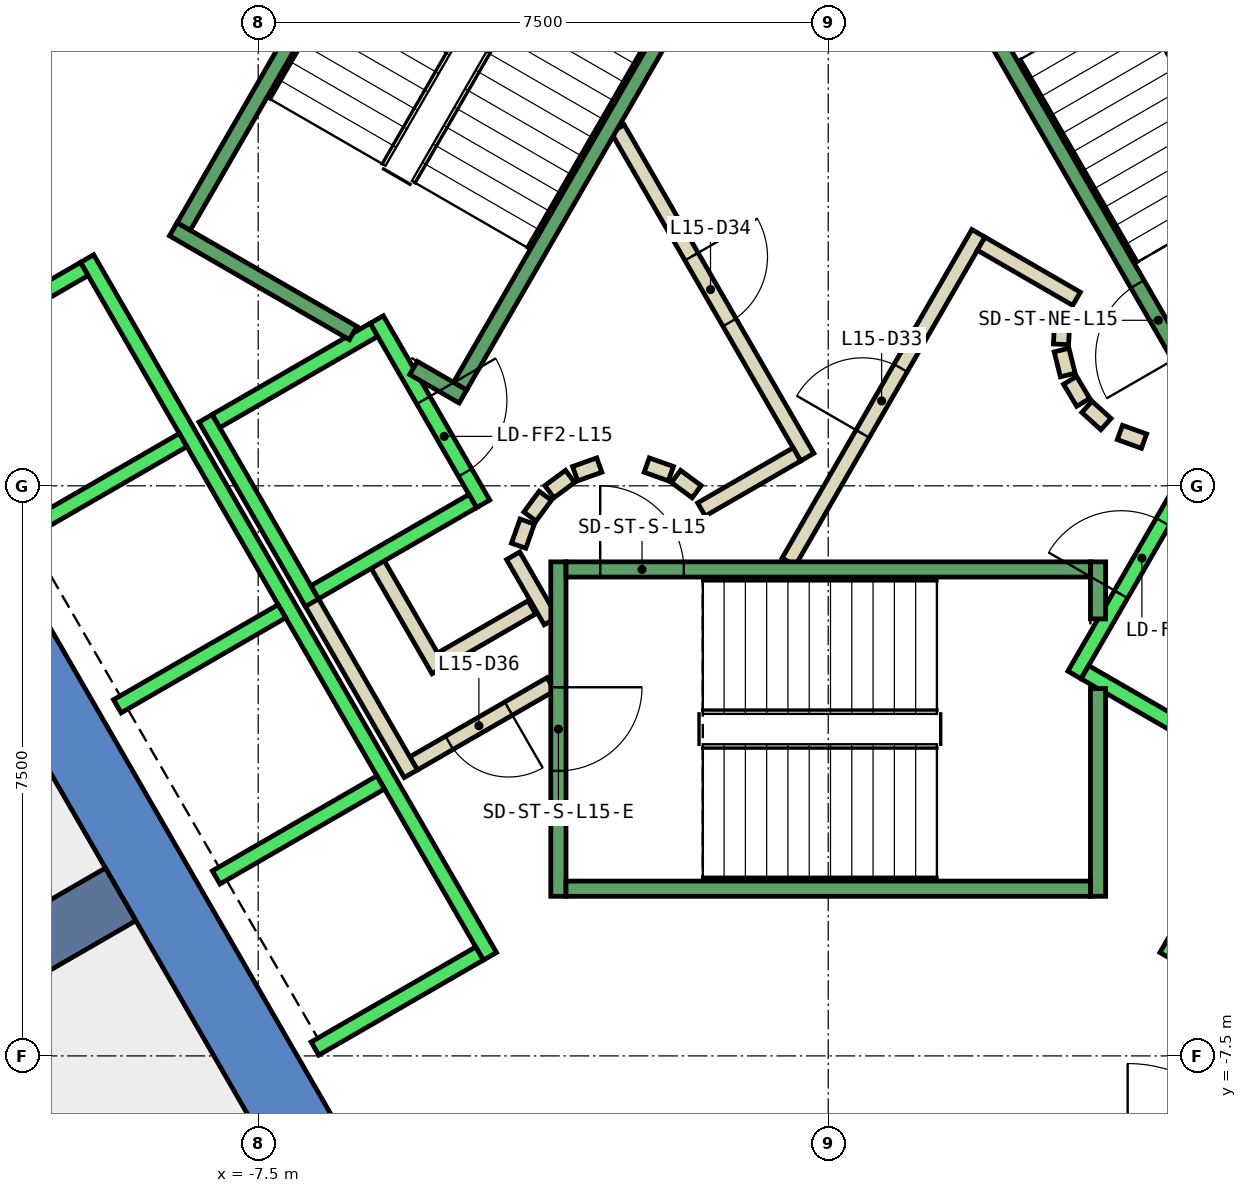
"""IFC4 building model, lengths in metres.
Left out: names, types, materials, properties, quantities, classifications, styles, units other than length and angle.
Written with IfcOpenShell. Run it as: python <this file> out.ifc"""

import sys

from ifc_helpers import new_model, si_unit, direction, frame, frame_2d, origin, place, context, subcontext, project, spatial, polyline, rectangle, outline, extrude, element, fill, save


model = new_model("IFC4")
c1 = context("Model", 3, precision=1e-05, world=origin(), true_north=direction((0.0, 1.0)))
c2 = subcontext(c1, "Body", "Model", "MODEL_VIEW")
j1 = project(units=[si_unit("LENGTHUNIT", "METRE"), si_unit("PLANEANGLEUNIT", "RADIAN")], contexts=[c1])
p1 = place(None, origin())
s1 = spatial("IfcSite", under=j1, at=p1, CompositionType="ELEMENT")
p2 = place(p1, origin())
s2 = spatial("IfcBuilding", under=s1, at=p2, CompositionType="ELEMENT")
p3 = place(p2, frame((0.0, 0.0, 72.8)))
s3 = spatial("IfcBuildingStorey", under=s2, at=p3, CompositionType="ELEMENT", Elevation=72.8)
p4 = place(p3, frame((0.0, 0.0, -0.4)))
e1 = element("IfcWall", 1, at=p4, inside=s3, PredefinedType="SHEAR", context=c2, shape_type="SweptSolid", body=[
    extrude(outline(polyline([(-12.267, 5.252), (-11.444, 4.777), (-6.38, 13.55), (-6.928, 14.5), (-12.267, 5.252)])), origin(), (0.0, 0.0, 1.0), 4.2),
])
p5 = place(p3, frame((0.0, 0.0, -0.4)))
e2 = element("IfcWall", 2, at=p5, inside=s3, PredefinedType="SHEAR", context=c2, shape_type="SweptSolid", body=[
    extrude(outline(polyline([(-13.856, 2.5), (-6.928, -9.5), (-6.38, -8.55), (-12.759, 2.5), (-13.856, 2.5)])), origin(), (0.0, 0.0, 1.0), 4.2),
])
p6 = place(p3, frame((-9.31, -5.375, -0.4), z_axis=(0.0, 0.0, 1.0), x_axis=(-0.866017533419, -0.500013631625, 0.0)))
e3 = element("IfcWall", 3, at=p6, inside=s3, PredefinedType="SHEAR", context=c2, shape_type="SweptSolid", body=[
    extrude(rectangle(XDim=9.0, YDim=0.8, at=frame_2d((4.5, 0.0))), origin(), (0.0, 0.0, 1.0), 4.2),
])
p7 = place(p3, frame((-3.9, -1.599, 0.0), z_axis=(0.0, 0.0, 1.0), x_axis=(-0.865969445389, -0.500096910261, 0.0)))
e4 = element("IfcWall", 4, at=p7, inside=s3, PredefinedType="PARTITIONING", context=c2, shape_type="SweptSolid", body=[
    extrude(rectangle(XDim=1.373, YDim=0.2, at=frame_2d((0.687, 0.0))), origin(), (0.0, 0.0, 1.0), 3.8),
])
p8 = place(p3, frame((-5.126, -2.422, 0.0), z_axis=(0.0, 0.0, 1.0), x_axis=(-0.500062241894, 0.865989465428, 0.0)))
e5 = element("IfcWall", 5, at=p8, inside=s3, PredefinedType="PARTITIONING", context=c2, shape_type="SweptSolid", body=[
    extrude(rectangle(XDim=1.7, YDim=0.2, at=frame_2d((0.85, 0.0))), origin(), (0.0, 0.0, 1.0), 3.8),
])
p9 = place(p3, frame((-3.65, -2.61, 0.0), z_axis=(0.0, 0.0, 1.0), x_axis=(-0.866072462134, -0.499918483688, 0.0)))
e6 = element("IfcWall", 6, at=p9, inside=s3, PredefinedType="PARTITIONING", context=c2, shape_type="SweptSolid", body=[
    extrude(rectangle(XDim=2.084, YDim=0.2, at=frame_2d((1.042, 0.0))), origin(), (0.0, 0.0, 1.0), 3.8),
])
p10 = place(p9, frame((0.642, 0.0, 0.0)))
e7 = element("IfcOpeningElement", 7, at=p10, cuts=e6, PredefinedType="OPENING", context=c2, shape_type="SweptSolid", body=[
    extrude(rectangle(XDim=0.9, YDim=2.1, at=frame_2d((0.45, 1.05))), frame((0.0, 0.11, 0.0), z_axis=(0.0, -1.0, 0.0), x_axis=(1.0, 0.0, 0.0)), (0.0, 0.0, 1.0), 0.22),
])
p11 = place(p3, frame((-5.492, -3.788, 0.0), z_axis=(0.0, 0.0, 1.0), x_axis=(-0.500008949224, 0.866020236886, 0.0)))
e8 = element("IfcWall", 8, at=p11, inside=s3, PredefinedType="PARTITIONING", context=c2, shape_type="SweptSolid", body=[
    extrude(rectangle(XDim=2.68, YDim=0.2, at=frame_2d((1.34, 0.0))), origin(), (0.0, 0.0, 1.0), 3.8),
])
p12 = place(p3, frame((-4.145, -0.92, 0.0), z_axis=(0.0, 0.0, 1.0), x_axis=(0.499743786207, -0.866173278362, 0.0)))
e9 = element("IfcWall", 9, at=p12, inside=s3, PredefinedType="PARTITIONING", context=c2, shape_type="SweptSolid", body=[
    extrude(rectangle(XDim=0.991, YDim=0.2, at=frame_2d((0.495, 0.0))), origin(), (0.0, 0.0, 1.0), 3.8),
])
p13 = place(p3, frame((-0.52, -1.0, 0.0), z_axis=(0.0, 0.0, 1.0), x_axis=(0.50011622646, 0.865958290007, 0.0)))
e10 = element("IfcWall", 10, at=p13, inside=s3, PredefinedType="PARTITIONING", context=c2, shape_type="SweptSolid", body=[
    extrude(rectangle(XDim=4.991, YDim=0.2, at=frame_2d((2.496, 0.0))), origin(), (0.0, 0.0, 1.0), 3.8),
])
p14 = place(p13, frame((1.945, 0.0, 0.0)))
e11 = element("IfcOpeningElement", 11, at=p14, cuts=e10, PredefinedType="OPENING", context=c2, shape_type="SweptSolid", body=[
    extrude(rectangle(XDim=1.0, YDim=2.1, at=frame_2d((0.5, 1.05))), frame((0.0, 0.11, 0.0), z_axis=(0.0, -1.0, 0.0), x_axis=(1.0, 0.0, 0.0)), (0.0, 0.0, 1.0), 0.22),
])
p15 = place(p3, frame((2.012, 3.186, 0.0), z_axis=(0.0, 0.0, 1.0), x_axis=(0.865891012941, -0.500232699559, 0.0)))
e12 = element("IfcWall", 12, at=p15, inside=s3, PredefinedType="PARTITIONING", context=c2, shape_type="SweptSolid", body=[
    extrude(rectangle(XDim=1.449, YDim=0.2, at=frame_2d((0.725, 0.0))), origin(), (0.0, 0.0, 1.0), 3.8),
])
p16 = place(p3, frame((3.079, 2.199, 0.0), z_axis=(0.0, 0.0, 1.0), x_axis=(-0.047771483479, -0.998858290933, 0.0)))
e13 = element("IfcWall", 13, at=p16, inside=s3, PredefinedType="PARTITIONING", context=c2, shape_type="SweptSolid", body=[
    extrude(rectangle(XDim=0.337, YDim=0.2, at=frame_2d((0.169, 0.0))), origin(), (0.0, 0.0, 1.0), 3.8),
])
p17 = place(p3, frame((3.07, 1.786, 0.0), z_axis=(0.0, 0.0, 1.0), x_axis=(0.242705583207, -0.970099994784, 0.0)))
e14 = element("IfcWall", 14, at=p17, inside=s3, PredefinedType="PARTITIONING", context=c2, shape_type="SweptSolid", body=[
    extrude(rectangle(XDim=0.338, YDim=0.2, at=frame_2d((0.169, 0.0))), origin(), (0.0, 0.0, 1.0), 3.8),
])
for number, where, z_axis, x_axis in (
    (15, (3.182, 1.388, 0.0), (0.0, 0.0, 1.0), (0.512, -0.859, 0.0)),
    (16, (3.404, 1.039, 0.0), (0.0, 0.0, 1.0), (0.74, -0.672, 0.0)),
):
    element("IfcWall", number, at=place(p3, frame(where, z_axis=z_axis, x_axis=x_axis)), inside=s3, PredefinedType="PARTITIONING", context=c2, shape_type="SweptSolid", body=[
        extrude(rectangle(XDim=0.338, YDim=0.2, at=frame_2d((0.169, 0.0))), origin(), (0.0, 0.0, 1.0), 3.8),
    ])
p18 = place(p3, frame((3.838, 0.702, 0.0), z_axis=(0.0, 0.0, 1.0), x_axis=(0.941035081519, -0.338308993895, 0.0)))
e17 = element("IfcWall", 17, at=p18, inside=s3, PredefinedType="PARTITIONING", context=c2, shape_type="SweptSolid", body=[
    extrude(rectangle(XDim=0.337, YDim=0.2, at=frame_2d((0.168, 0.0))), origin(), (0.0, 0.0, 1.0), 3.8),
])
p19 = place(p3, frame((-2.771, 4.7, 0.0), z_axis=(0.0, 0.0, 1.0), x_axis=(0.499969479948, -0.866043023828, 0.0)))
e18 = element("IfcWall", 18, at=p19, inside=s3, PredefinedType="PARTITIONING", context=c2, shape_type="SweptSolid", body=[
    extrude(rectangle(XDim=4.99, YDim=0.2, at=frame_2d((2.495, 0.0))), origin(), (0.0, 0.0, 1.0), 3.8),
])
p20 = place(p19, frame((1.945, 0.0, 0.0)))
e19 = element("IfcOpeningElement", 19, at=p20, cuts=e18, PredefinedType="OPENING", context=c2, shape_type="SweptSolid", body=[
    extrude(rectangle(XDim=1.0, YDim=2.1, at=frame_2d((0.5, 1.05))), frame((0.0, 0.11, 0.0), z_axis=(0.0, -1.0, 0.0), x_axis=(1.0, 0.0, 0.0)), (0.0, 0.0, 1.0), 0.22),
])
p21 = place(p3, frame((-0.412, 0.414, 0.0), z_axis=(0.0, 0.0, 1.0), x_axis=(-0.866017369001, -0.500013916395, 0.0)))
e20 = element("IfcWall", 20, at=p21, inside=s3, PredefinedType="PARTITIONING", context=c2, shape_type="SweptSolid", body=[
    extrude(rectangle(XDim=1.45, YDim=0.2, at=frame_2d((0.725, 0.0))), origin(), (0.0, 0.0, 1.0), 3.8),
])
p22 = place(p3, frame((-1.731, -0.077, 0.0), z_axis=(0.0, 0.0, 1.0), x_axis=(-0.804311165252, 0.594208338422, 0.0)))
e21 = element("IfcWall", 21, at=p22, inside=s3, PredefinedType="PARTITIONING", context=c2, shape_type="SweptSolid", body=[
    extrude(rectangle(XDim=0.338, YDim=0.2, at=frame_2d((0.169, 0.0))), origin(), (0.0, 0.0, 1.0), 3.8),
])
p23 = place(p3, frame((-2.07, 0.16, 0.0), z_axis=(0.0, 0.0, 1.0), x_axis=(-0.942199461132, 0.335052496547, 0.0)))
e22 = element("IfcWall", 22, at=p23, inside=s3, PredefinedType="PARTITIONING", context=c2, shape_type="SweptSolid", body=[
    extrude(rectangle(XDim=0.337, YDim=0.2, at=frame_2d((0.169, 0.0))), origin(), (0.0, 0.0, 1.0), 3.8),
])
p24 = place(p3, frame((-3.012, 0.273, 0.0), z_axis=(0.0, 0.0, 1.0), x_axis=(-0.942280615813, -0.334824194261, 0.0)))
e23 = element("IfcWall", 23, at=p24, inside=s3, PredefinedType="PARTITIONING", context=c2, shape_type="SweptSolid", body=[
    extrude(rectangle(XDim=0.338, YDim=0.2, at=frame_2d((0.169, 0.0))), origin(), (0.0, 0.0, 1.0), 3.8),
])
p25 = place(p3, frame((-3.397, 0.124, 0.0), z_axis=(0.0, 0.0, 1.0), x_axis=(-0.804311165252, -0.594208338422, 0.0)))
e24 = element("IfcWall", 24, at=p25, inside=s3, PredefinedType="PARTITIONING", context=c2, shape_type="SweptSolid", body=[
    extrude(rectangle(XDim=0.338, YDim=0.2, at=frame_2d((0.169, 0.0))), origin(), (0.0, 0.0, 1.0), 3.8),
])
p26 = place(p3, frame((-3.723, -0.131, 0.0), z_axis=(0.0, 0.0, 1.0), x_axis=(-0.594675113454, -0.803966112121, 0.0)))
e25 = element("IfcWall", 25, at=p26, inside=s3, PredefinedType="PARTITIONING", context=c2, shape_type="SweptSolid", body=[
    extrude(rectangle(XDim=0.338, YDim=0.2, at=frame_2d((0.169, 0.0))), origin(), (0.0, 0.0, 1.0), 3.8),
])
p27 = place(p3, frame((-3.96, -0.47, 0.0), z_axis=(0.0, 0.0, 1.0), x_axis=(-0.334824194261, -0.942280615813, 0.0)))
e26 = element("IfcWall", 26, at=p27, inside=s3, PredefinedType="PARTITIONING", context=c2, shape_type="SweptSolid", body=[
    extrude(rectangle(XDim=0.338, YDim=0.2, at=frame_2d((0.169, 0.0))), origin(), (0.0, 0.0, 1.0), 3.8),
])
p28 = place(p3, frame((-5.94, 2.188, 0.0), z_axis=(0.0, 0.0, 1.0), x_axis=(0.49994636267, -0.866056369097, 0.0)))
e27 = element("IfcWall", 27, at=p28, inside=s3, PredefinedType="STANDARD", context=c2, shape_type="SweptSolid", body=[
    extrude(rectangle(XDim=2.8, YDim=0.2, at=frame_2d((1.4, 0.0))), origin(), (0.0, 0.0, 1.0), 3.8),
])
p29 = place(p28, frame((1.225, 0.0, 0.0)))
e28 = element("IfcOpeningElement", 28, at=p29, cuts=e27, PredefinedType="OPENING", context=c2, shape_type="SweptSolid", body=[
    extrude(rectangle(XDim=1.1, YDim=2.1, at=frame_2d((0.55, 1.05))), frame((0.0, 0.11, 0.0), z_axis=(0.0, -1.0, 0.0), x_axis=(1.0, 0.0, 0.0)), (0.0, 0.0, 1.0), 0.22),
])
p30 = place(p3, frame((-8.192, 0.888, 0.0), z_axis=(0.0, 0.0, 1.0), x_axis=(0.49994636267, -0.866056369097, 0.0)))
e29 = element("IfcWall", 29, at=p30, inside=s3, PredefinedType="STANDARD", context=c2, shape_type="SweptSolid", body=[
    extrude(rectangle(XDim=2.8, YDim=0.2, at=frame_2d((1.4, 0.0))), origin(), (0.0, 0.0, 1.0), 3.8),
])
for number, where, z_axis, x_axis in (
    (30, (-5.977, 2.052, 0.0), (0.0, 0.0, 1.0), (-0.866, -0.5, 0.0)),
    (31, (-4.677, -0.2, 0.0), (0.0, 0.0, 1.0), (-0.866, -0.5, 0.0)),
):
    element("IfcWall", number, at=place(p3, frame(where, z_axis=z_axis, x_axis=x_axis)), inside=s3, PredefinedType="STANDARD", context=c2, shape_type="SweptSolid", body=[
        extrude(rectangle(XDim=2.399, YDim=0.2, at=frame_2d((1.2, 0.0))), origin(), (0.0, 0.0, 1.0), 3.8),
    ])
p31 = place(p3, frame((-9.751, 2.99, 0.0), z_axis=(0.0, 0.0, 1.0), x_axis=(0.50000090737, -0.866024879913, 0.0)))
e32 = element("IfcWall", 32, at=p31, inside=s3, PredefinedType="STANDARD", context=c2, shape_type="SweptSolid", body=[
    extrude(rectangle(XDim=10.6, YDim=0.2, at=frame_2d((5.3, 0.0))), origin(), (0.0, 0.0, 1.0), 3.8),
])
p32 = place(p3, frame((-9.788, 2.853, 0.0), z_axis=(0.0, 0.0, 1.0), x_axis=(-0.865998541277, -0.500046524342, 0.0)))
e33 = element("IfcWall", 33, at=p32, inside=s3, PredefinedType="STANDARD", context=c2, shape_type="SweptSolid", body=[
    extrude(rectangle(XDim=2.5, YDim=0.2, at=frame_2d((1.25, 0.0))), origin(), (0.0, 0.0, 1.0), 3.8),
])
for number, where, z_axis, x_axis in (
    (34, (-8.488, 0.602, 0.0), (0.0, 0.0, 1.0), (-0.866, -0.5, 0.0)),
    (35, (-7.188, -1.65, 0.0), (0.0, 0.0, 1.0), (-0.866, -0.5, 0.0)),
    (36, (-5.888, -3.902, 0.0), (0.0, 0.0, 1.0), (-0.866, -0.5, 0.0)),
    (37, (-4.588, -6.153, 0.0), (0.0, 0.0, 1.0), (-0.866, -0.5, 0.0)),
):
    element("IfcWall", number, at=place(p3, frame(where, z_axis=z_axis, x_axis=x_axis)), inside=s3, PredefinedType="STANDARD", context=c2, shape_type="SweptSolid", body=[
        extrude(rectangle(XDim=2.5, YDim=0.2, at=frame_2d((1.25, 0.0))), origin(), (0.0, 0.0, 1.0), 3.8),
    ])
p33 = place(p3, frame((3.24, -2.488, 0.0), z_axis=(0.0, 0.0, 1.0), x_axis=(0.49994636267, 0.866056369097, 0.0)))
e38 = element("IfcWall", 38, at=p33, inside=s3, PredefinedType="STANDARD", context=c2, shape_type="SweptSolid", body=[
    extrude(rectangle(XDim=2.8, YDim=0.2, at=frame_2d((1.4, 0.0))), origin(), (0.0, 0.0, 1.0), 3.8),
])
p34 = place(p33, frame((1.225, 0.0, 0.0)))
e39 = element("IfcOpeningElement", 39, at=p34, cuts=e38, PredefinedType="OPENING", context=c2, shape_type="SweptSolid", body=[
    extrude(rectangle(XDim=1.1, YDim=2.1, at=frame_2d((0.55, 1.05))), frame((0.0, 0.11, 0.0), z_axis=(0.0, -1.0, 0.0), x_axis=(1.0, 0.0, 0.0)), (0.0, 0.0, 1.0), 0.22),
])
p35 = place(p3, frame((3.377, -2.452, 0.0), z_axis=(0.0, 0.0, 1.0), x_axis=(0.865955154139, -0.50012165622, 0.0)))
e40 = element("IfcWall", 40, at=p35, inside=s3, PredefinedType="STANDARD", context=c2, shape_type="SweptSolid", body=[
    extrude(rectangle(XDim=2.4, YDim=0.2, at=frame_2d((1.2, 0.0))), origin(), (0.0, 0.0, 1.0), 3.8),
])
p36 = place(p3, frame((4.451, -6.19, 0.0), z_axis=(0.0, 0.0, 1.0), x_axis=(0.50000090737, 0.866024879913, 0.0)))
e41 = element("IfcWall", 41, at=p36, inside=s3, PredefinedType="STANDARD", context=c2, shape_type="SweptSolid", body=[
    extrude(rectangle(XDim=10.6, YDim=0.2, at=frame_2d((5.3, 0.0))), origin(), (0.0, 0.0, 1.0), 3.8),
])
p37 = place(p3, frame((-3.55, -1.0, 0.0), z_axis=(0.0, 0.0, 1.0), x_axis=(0.0, -1.0, 0.0)))
e42 = element("IfcWall", 42, at=p37, inside=s3, PredefinedType="STANDARD", context=c2, shape_type="SweptSolid", body=[
    extrude(rectangle(XDim=4.4, YDim=0.2, at=frame_2d((2.2, 0.0))), origin(), (0.0, 0.0, 1.0), 3.8),
])
p38 = place(p37, frame((1.65, 0.0, 0.0)))
e43 = element("IfcOpeningElement", 43, at=p38, cuts=e42, PredefinedType="OPENING", context=c2, shape_type="SweptSolid", body=[
    extrude(rectangle(XDim=1.1, YDim=2.2, at=frame_2d((0.55, 1.1))), frame((0.0, 0.11, 0.0), z_axis=(0.0, -1.0, 0.0), x_axis=(1.0, 0.0, 0.0)), (0.0, 0.0, 1.0), 0.22),
])
p39 = place(p3, frame((3.55, -2.667, 0.0), z_axis=(0.0, 0.0, 1.0), x_axis=(0.0, -1.0, 0.0)))
e44 = element("IfcWall", 44, at=p39, inside=s3, PredefinedType="STANDARD", context=c2, shape_type="SweptSolid", body=[
    extrude(rectangle(XDim=2.733, YDim=0.2, at=frame_2d((1.366, 0.0))), origin(), (0.0, 0.0, 1.0), 3.8),
])
p40 = place(p3, frame((3.55, -1.0, 0.0), z_axis=(0.0, 0.0, 1.0), x_axis=(0.0, -1.0, 0.0)))
e45 = element("IfcWall", 45, at=p40, inside=s3, PredefinedType="STANDARD", context=c2, shape_type="SweptSolid", body=[
    extrude(rectangle(XDim=0.751, YDim=0.2, at=frame_2d((0.375, 0.0))), origin(), (0.0, 0.0, 1.0), 3.8),
])
p41 = place(p3, frame((-3.45, -1.1, 0.0), z_axis=(0.0, 0.0, 1.0), x_axis=(1.0, 0.0, 0.0)))
e46 = element("IfcWall", 46, at=p41, inside=s3, PredefinedType="STANDARD", context=c2, shape_type="SweptSolid", body=[
    extrude(rectangle(XDim=6.9, YDim=0.2, at=frame_2d((3.45, 0.0))), origin(), (0.0, 0.0, 1.0), 3.8),
])
p42 = place(p41, frame((0.45, 0.0, 0.0)))
e47 = element("IfcOpeningElement", 47, at=p42, cuts=e46, PredefinedType="OPENING", context=c2, shape_type="SweptSolid", body=[
    extrude(rectangle(XDim=1.1, YDim=2.2, at=frame_2d((0.55, 1.1))), frame((0.0, 0.11, 0.0), z_axis=(0.0, -1.0, 0.0), x_axis=(1.0, 0.0, 0.0)), (0.0, 0.0, 1.0), 0.22),
])
p43 = place(p3, frame((-3.45, -5.3, 0.0), z_axis=(0.0, 0.0, 1.0), x_axis=(1.0, 0.0, 0.0)))
e48 = element("IfcWall", 48, at=p43, inside=s3, PredefinedType="STANDARD", context=c2, shape_type="SweptSolid", body=[
    extrude(rectangle(XDim=6.9, YDim=0.2, at=frame_2d((3.45, 0.0))), origin(), (0.0, 0.0, 1.0), 3.8),
])
p44 = place(p3, frame((4.843, 1.312, 0.0), z_axis=(0.0, 0.0, 1.0), x_axis=(-0.499963383562, 0.866046543262, 0.0)))
e49 = element("IfcWall", 49, at=p44, inside=s3, PredefinedType="STANDARD", context=c2, shape_type="SweptSolid", body=[
    extrude(rectangle(XDim=6.9, YDim=0.2, at=frame_2d((3.45, 0.0))), origin(), (0.0, 0.0, 1.0), 3.8),
])
p45 = place(p44, frame((0.45, 0.0, 0.0)))
e50 = element("IfcOpeningElement", 50, at=p45, cuts=e49, PredefinedType="OPENING", context=c2, shape_type="SweptSolid", body=[
    extrude(rectangle(XDim=1.1, YDim=2.2, at=frame_2d((0.55, 1.1))), frame((0.0, 0.11, 0.0), z_axis=(0.0, -1.0, 0.0), x_axis=(1.0, 0.0, 0.0)), (0.0, 0.0, 1.0), 0.22),
])
p46 = place(p3, frame((-6.25, 2.01, 0.0), z_axis=(0.0, 0.0, 1.0), x_axis=(-0.86611865017, 0.499838457731, 0.0)))
e51 = element("IfcWall", 51, at=p46, inside=s3, PredefinedType="STANDARD", context=c2, shape_type="SweptSolid", body=[
    extrude(rectangle(XDim=2.733, YDim=0.2, at=frame_2d((1.366, 0.0))), origin(), (0.0, 0.0, 1.0), 3.8),
])
p47 = place(p3, frame((-4.806, 1.176, 0.0), z_axis=(0.0, 0.0, 1.0), x_axis=(-0.866558586415, 0.499075361355, 0.0)))
e52 = element("IfcWall", 52, at=p47, inside=s3, PredefinedType="STANDARD", context=c2, shape_type="SweptSolid", body=[
    extrude(rectangle(XDim=0.751, YDim=0.2, at=frame_2d((0.376, 0.0))), origin(), (0.0, 0.0, 1.0), 3.8),
])
p48 = place(p3, frame((-1.393, 7.288, 0.0), z_axis=(0.0, 0.0, 1.0), x_axis=(-0.499963383562, -0.866046543262, 0.0)))
e53 = element("IfcWall", 53, at=p48, inside=s3, PredefinedType="STANDARD", context=c2, shape_type="SweptSolid", body=[
    extrude(rectangle(XDim=6.9, YDim=0.2, at=frame_2d((3.45, 0.0))), origin(), (0.0, 0.0, 1.0), 3.8),
])
p49 = place(p48, frame((0.45, 0.0, 0.0)))
e54 = element("IfcOpeningElement", 54, at=p49, cuts=e53, PredefinedType="OPENING", context=c2, shape_type="SweptSolid", body=[
    extrude(rectangle(XDim=1.1, YDim=2.2, at=frame_2d((0.55, 1.1))), frame((0.0, 0.11, 0.0), z_axis=(0.0, -1.0, 0.0), x_axis=(1.0, 0.0, 0.0)), (0.0, 0.0, 1.0), 0.22),
])
p50 = place(p3, frame((-5.03, 9.388, 0.0), z_axis=(0.0, 0.0, 1.0), x_axis=(-0.499978703459, -0.866037698999, 0.0)))
e55 = element("IfcWall", 55, at=p50, inside=s3, PredefinedType="STANDARD", context=c2, shape_type="SweptSolid", body=[
    extrude(rectangle(XDim=6.9, YDim=0.2, at=frame_2d((3.45, 0.0))), origin(), (0.0, 0.0, 1.0), 3.8),
])
p51 = place(p14, origin())
e56 = element("IfcDoor", 56, at=p51, inside=s3, OperationType="SINGLE_SWING_LEFT", PredefinedType="DOOR", context=c2, shape_type="SweptSolid", body=[
    extrude(rectangle(XDim=1.0, YDim=2.1, at=frame_2d((0.5, 1.05))), frame((0.0, 0.025, 0.0), z_axis=(0.0, -1.0, 0.0), x_axis=(1.0, 0.0, 0.0)), (0.0, 0.0, 1.0), 0.05),
])
fill(e11, e56)
p52 = place(p20, origin())
e57 = element("IfcDoor", 57, at=p52, inside=s3, OperationType="SINGLE_SWING_RIGHT", PredefinedType="DOOR", context=c2, shape_type="SweptSolid", body=[
    extrude(rectangle(XDim=1.0, YDim=2.1, at=frame_2d((0.5, 1.05))), frame((0.0, 0.025, 0.0), z_axis=(0.0, -1.0, 0.0), x_axis=(1.0, 0.0, 0.0)), (0.0, 0.0, 1.0), 0.05),
])
fill(e19, e57)
p53 = place(p10, origin())
e58 = element("IfcDoor", 58, at=p53, inside=s3, OperationType="SINGLE_SWING_LEFT", PredefinedType="DOOR", context=c2, shape_type="SweptSolid", body=[
    extrude(rectangle(XDim=0.9, YDim=2.1, at=frame_2d((0.45, 1.05))), frame((0.0, 0.025, 0.0), z_axis=(0.0, -1.0, 0.0), x_axis=(1.0, 0.0, 0.0)), (0.0, 0.0, 1.0), 0.05),
])
fill(e7, e58)
p54 = place(p34, origin())
e59 = element("IfcDoor", 59, at=p54, inside=s3, OperationType="SLIDING_TO_LEFT", PredefinedType="DOOR", context=c2, shape_type="SweptSolid", body=[
    extrude(rectangle(XDim=1.1, YDim=2.1, at=frame_2d((0.55, 1.05))), frame((0.0, 0.025, 0.0), z_axis=(0.0, -1.0, 0.0), x_axis=(1.0, 0.0, 0.0)), (0.0, 0.0, 1.0), 0.05),
])
fill(e39, e59)
p55 = place(p29, origin())
e60 = element("IfcDoor", 60, at=p55, inside=s3, OperationType="SLIDING_TO_LEFT", PredefinedType="DOOR", context=c2, shape_type="SweptSolid", body=[
    extrude(rectangle(XDim=1.1, YDim=2.1, at=frame_2d((0.55, 1.05))), frame((0.0, 0.025, 0.0), z_axis=(0.0, -1.0, 0.0), x_axis=(1.0, 0.0, 0.0)), (0.0, 0.0, 1.0), 0.05),
])
fill(e28, e60)
p56 = place(p42, origin())
e61 = element("IfcDoor", 61, at=p56, inside=s3, OperationType="SINGLE_SWING_LEFT", PredefinedType="DOOR", context=c2, shape_type="SweptSolid", body=[
    extrude(rectangle(XDim=1.1, YDim=2.2, at=frame_2d((0.55, 1.1))), frame((0.0, 0.025, 0.0), z_axis=(0.0, -1.0, 0.0), x_axis=(1.0, 0.0, 0.0)), (0.0, 0.0, 1.0), 0.05),
])
fill(e47, e61)
p57 = place(p38, origin())
e62 = element("IfcDoor", 62, at=p57, inside=s3, OperationType="SINGLE_SWING_LEFT", PredefinedType="DOOR", context=c2, shape_type="SweptSolid", body=[
    extrude(rectangle(XDim=1.1, YDim=2.2, at=frame_2d((0.55, 1.1))), frame((0.0, 0.025, 0.0), z_axis=(0.0, -1.0, 0.0), x_axis=(1.0, 0.0, 0.0)), (0.0, 0.0, 1.0), 0.05),
])
fill(e43, e62)
p58 = place(p45, origin())
e63 = element("IfcDoor", 63, at=p58, inside=s3, OperationType="SINGLE_SWING_LEFT", PredefinedType="DOOR", context=c2, shape_type="SweptSolid", body=[
    extrude(rectangle(XDim=1.1, YDim=2.2, at=frame_2d((0.55, 1.1))), frame((0.0, 0.025, 0.0), z_axis=(0.0, -1.0, 0.0), x_axis=(1.0, 0.0, 0.0)), (0.0, 0.0, 1.0), 0.05),
])
fill(e50, e63)
save(model, sys.argv[1])
